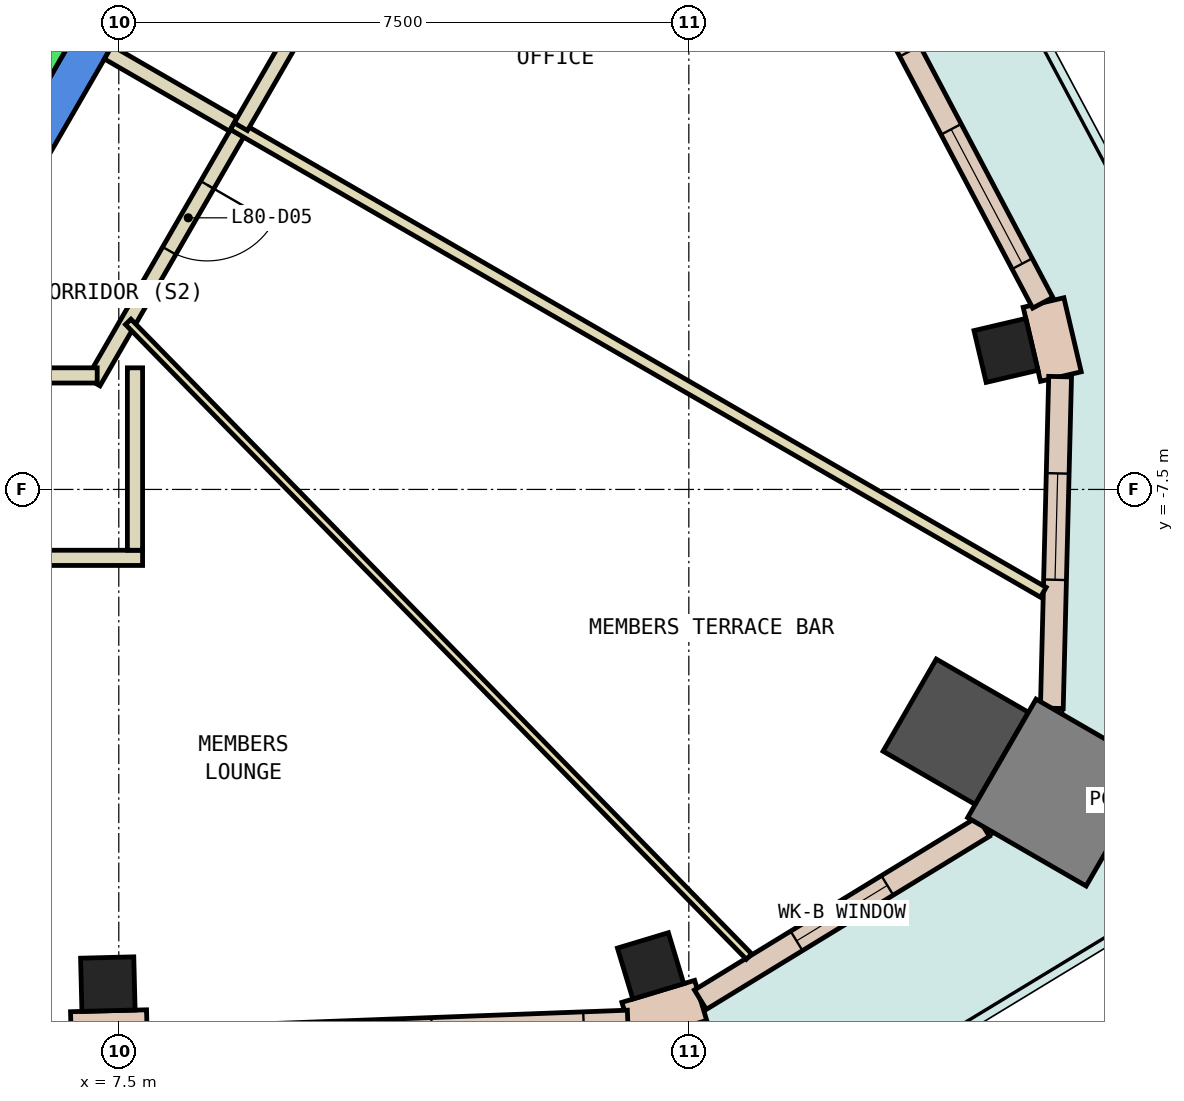
"""IFC4 building model, lengths in metres.
Left out: names, types, materials, properties, quantities, classifications, styles, units other than length and angle.
Written with IfcOpenShell. Run it as: python <this file> out.ifc"""

import sys

from ifc_helpers import new_model, si_unit, direction, frame, frame_2d, origin, origin_2d, place, context, subcontext, project, spatial, polyline, rectangle, outline, extrude, element, fill, save


model = new_model("IFC4")
c1 = context("Model", 3, precision=1e-05, world=origin(), true_north=direction((0.0, 1.0)))
c2 = subcontext(c1, "Body", "Model", "MODEL_VIEW")
j1 = project(units=[si_unit("LENGTHUNIT", "METRE"), si_unit("PLANEANGLEUNIT", "RADIAN")], contexts=[c1])
p1 = place(None, origin())
s1 = spatial("IfcSite", under=j1, at=p1, CompositionType="ELEMENT")
p2 = place(p1, origin())
s2 = spatial("IfcBuilding", under=s1, at=p2, CompositionType="ELEMENT")
p3 = place(p2, frame((0.0, 0.0, 340.4)))
s3 = spatial("IfcBuildingStorey", under=s2, at=p3, CompositionType="ELEMENT", Elevation=340.4)
for number, where, z_axis, x_axis in (
    (1, (7.356, -14.008, 0.0), (0.0, 0.0, 1.0), (1.0, 0.025, 0.0)),
    (2, (14.497, -13.768, 0.0), (0.0, 0.0, 1.0), (0.957, 0.289, 0.0)),
):
    element("IfcColumn", number, at=place(p3, frame(where, z_axis=z_axis, x_axis=x_axis)), inside=s3, PredefinedType="COLUMN", context=c2, shape_type="SweptSolid", body=[
        extrude(rectangle(XDim=0.7, YDim=0.7, at=origin_2d()), origin(), (0.0, 0.0, 1.0), 4.15),
    ])
p4 = place(p3, frame((18.512, -10.688, 0.0), z_axis=(0.0, 0.0, 1.0), x_axis=(-0.866025403784, 0.5, 0.0)))
e3 = element("IfcColumn", 3, at=p4, inside=s3, PredefinedType="COLUMN", context=c2, shape_type="SweptSolid", body=[
    extrude(rectangle(XDim=1.4, YDim=1.4, at=origin_2d()), origin(), (0.0, 0.0, 1.0), 4.15),
])
p5 = place(p3, frame((19.173, -5.671, 0.0), z_axis=(0.0, 0.0, 1.0), x_axis=(-0.228435830028, 0.973558971793, 0.0)))
e4 = element("IfcColumn", 4, at=p5, inside=s3, PredefinedType="COLUMN", context=c2, shape_type="SweptSolid", body=[
    extrude(rectangle(XDim=0.7, YDim=0.7, at=origin_2d()), origin(), (0.0, 0.0, 1.0), 4.15),
])
p6 = place(p3, frame((19.898, -11.488, 0.0), z_axis=(0.0, 0.0, 1.0), x_axis=(-0.866025403784, 0.5, 0.0)))
e5 = element("IfcColumn", 5, at=p6, inside=s3, PredefinedType="COLUMN", context=c2, shape_type="SweptSolid", body=[
    extrude(rectangle(XDim=1.8, YDim=1.8, at=origin_2d()), origin(), (0.0, 0.0, 1.0), 4.15),
])
p7 = place(p3, frame((0.0, 0.0, -0.45)))
e6 = element("IfcWall", 6, at=p7, inside=s3, PredefinedType="SHEAR", context=c2, shape_type="SweptSolid", body=[
    extrude(outline(polyline([(4.907, -6.0), (9.815, 2.5), (9.238, 2.5), (4.619, -5.5), (4.907, -6.0)])), origin(), (0.0, 0.0, 1.0), 4.6),
])
for number, where, z_axis, x_axis in (
    (7, (19.895, -6.015, 0.0), (0.0, 0.0, 1.0), (-0.228, 0.974, 0.0)),
    (8, (6.872, -14.646, 0.0), (0.0, 0.0, 1.0), (1.0, 0.025, 0.0)),
):
    element("IfcWall", number, at=place(p3, frame(where, z_axis=z_axis, x_axis=x_axis)), inside=s3, PredefinedType="STANDARD", context=c2, shape_type="SweptSolid", body=[
        extrude(rectangle(XDim=1.0, YDim=0.55, at=frame_2d((0.5, 0.0))), origin(), (0.0, 0.0, 1.0), 4.15),
    ])
p8 = place(p3, frame((14.199, -14.511, 0.0), z_axis=(0.0, 0.0, 1.0), x_axis=(0.957286907321, 0.289139718946, 0.0)))
e9 = element("IfcWall", 9, at=p8, inside=s3, PredefinedType="STANDARD", context=c2, shape_type="SweptSolid", body=[
    extrude(rectangle(XDim=1.0, YDim=0.55, at=frame_2d((0.5, 0.0))), origin(), (0.0, 0.0, 1.0), 4.15),
])
p9 = place(p3, frame((7.874, -14.739, 0.0), z_axis=(0.0, 0.0, 1.0), x_axis=(0.999292132587, 0.03761959262, 0.0)))
e10 = element("IfcWall", 10, at=p9, inside=s3, PredefinedType="STANDARD", context=c2, shape_type="SweptSolid", body=[
    extrude(rectangle(XDim=6.327, YDim=0.3, at=frame_2d((3.164, 0.0))), origin(), (0.0, 0.0, 1.0), 4.15),
])
p10 = place(p9, frame((0.582, 0.0, 0.9)))
e11 = element("IfcOpeningElement", 11, at=p10, cuts=e10, PredefinedType="OPENING", context=c2, shape_type="SweptSolid", body=[
    extrude(rectangle(XDim=2.0, YDim=3.0, at=frame_2d((1.0, 1.5))), frame((0.0, 0.16, 0.0), z_axis=(0.0, -1.0, 0.0), x_axis=(1.0, 0.0, 0.0)), (0.0, 0.0, 1.0), 0.32),
])
p11 = place(p9, frame((3.746, 0.0, 0.9)))
e12 = element("IfcOpeningElement", 12, at=p11, cuts=e10, PredefinedType="OPENING", context=c2, shape_type="SweptSolid", body=[
    extrude(rectangle(XDim=2.0, YDim=3.0, at=frame_2d((1.0, 1.5))), frame((0.0, 0.16, 0.0), z_axis=(0.0, -1.0, 0.0), x_axis=(1.0, 0.0, 0.0)), (0.0, 0.0, 1.0), 0.32),
])
p12 = place(p3, frame((15.152, -14.213, 0.0), z_axis=(0.0, 0.0, 1.0), x_axis=(0.853225151066, 0.521542751448, 0.0)))
e13 = element("IfcWall", 13, at=p12, inside=s3, PredefinedType="STANDARD", context=c2, shape_type="SweptSolid", body=[
    extrude(rectangle(XDim=4.366, YDim=0.3, at=frame_2d((2.183, 0.0))), origin(), (0.0, 0.0, 1.0), 4.15),
])
p13 = place(p12, frame((1.483, 0.0, 0.9)))
e14 = element("IfcOpeningElement", 14, at=p13, cuts=e13, PredefinedType="OPENING", context=c2, shape_type="SweptSolid", body=[
    extrude(rectangle(XDim=1.4, YDim=3.0, at=frame_2d((0.7, 1.5))), frame((0.0, 0.16, 0.0), z_axis=(0.0, -1.0, 0.0), x_axis=(1.0, 0.0, 0.0)), (0.0, 0.0, 1.0), 0.32),
])
p14 = place(p3, frame((19.776, -10.379, 0.0), z_axis=(0.0, 0.0, 1.0), x_axis=(0.025006167975, 0.99968729689, 0.0)))
e15 = element("IfcWall", 15, at=p14, inside=s3, PredefinedType="STANDARD", context=c2, shape_type="SweptSolid", body=[
    extrude(rectangle(XDim=4.364, YDim=0.3, at=frame_2d((2.182, 0.0))), origin(), (0.0, 0.0, 1.0), 4.15),
])
p15 = place(p14, frame((1.691, 0.0, 0.9)))
e16 = element("IfcOpeningElement", 16, at=p15, cuts=e15, PredefinedType="OPENING", context=c2, shape_type="SweptSolid", body=[
    extrude(rectangle(XDim=1.4, YDim=3.0, at=frame_2d((0.7, 1.5))), frame((0.0, 0.16, 0.0), z_axis=(0.0, -1.0, 0.0), x_axis=(1.0, 0.0, 0.0)), (0.0, 0.0, 1.0), 0.32),
])
p16 = place(p3, frame((19.657, -5.044, 0.0), z_axis=(0.0, 0.0, 1.0), x_axis=(-0.467155191513, 0.884175337274, 0.0)))
e17 = element("IfcWall", 17, at=p16, inside=s3, PredefinedType="STANDARD", context=c2, shape_type="SweptSolid", body=[
    extrude(rectangle(XDim=6.326, YDim=0.3, at=frame_2d((3.163, 0.0))), origin(), (0.0, 0.0, 1.0), 4.15),
])
p17 = place(p16, frame((0.581, 0.0, 0.9)))
e18 = element("IfcOpeningElement", 18, at=p17, cuts=e17, PredefinedType="OPENING", context=c2, shape_type="SweptSolid", body=[
    extrude(rectangle(XDim=2.0, YDim=3.0, at=frame_2d((1.0, 1.5))), frame((0.0, 0.16, 0.0), z_axis=(0.0, -1.0, 0.0), x_axis=(1.0, 0.0, 0.0)), (0.0, 0.0, 1.0), 0.32),
])
p18 = place(p16, frame((3.744, 0.0, 0.9)))
e19 = element("IfcOpeningElement", 19, at=p18, cuts=e17, PredefinedType="OPENING", context=c2, shape_type="SweptSolid", body=[
    extrude(rectangle(XDim=2.0, YDim=3.0, at=frame_2d((1.0, 1.5))), frame((0.0, 0.16, 0.0), z_axis=(0.0, -1.0, 0.0), x_axis=(1.0, 0.0, 0.0)), (0.0, 0.0, 1.0), 0.32),
])
p19 = place(p3, frame((7.813, -8.4, 0.0), z_axis=(0.0, 0.0, 1.0), x_axis=(-1.0, 0.0, 0.0)))
e20 = element("IfcWall", 20, at=p19, inside=s3, PredefinedType="PARTITIONING", context=c2, shape_type="SweptSolid", body=[
    extrude(rectangle(XDim=5.769, YDim=0.2, at=frame_2d((2.885, 0.0))), origin(), (0.0, 0.0, 1.0), 4.15),
])
p20 = place(p19, frame((2.289, 0.0, 0.0)))
e21 = element("IfcOpeningElement", 21, at=p20, cuts=e20, PredefinedType="OPENING", context=c2, shape_type="SweptSolid", body=[
    extrude(rectangle(XDim=1.0, YDim=2.1, at=frame_2d((0.5, 1.05))), frame((0.0, 0.11, 0.0), z_axis=(0.0, -1.0, 0.0), x_axis=(1.0, 0.0, 0.0)), (0.0, 0.0, 1.0), 0.22),
])
p21 = place(p3, frame((7.713, -5.9, 0.0), z_axis=(0.0, 0.0, 1.0), x_axis=(0.0, -1.0, 0.0)))
e22 = element("IfcWall", 22, at=p21, inside=s3, PredefinedType="PARTITIONING", context=c2, shape_type="SweptSolid", body=[
    extrude(rectangle(XDim=2.4, YDim=0.2, at=frame_2d((1.2, 0.0))), origin(), (0.0, 0.0, 1.0), 4.15),
])
p22 = place(p3, frame((9.106, -2.728, 0.0), z_axis=(0.0, 0.0, 1.0), x_axis=(-0.500132879116, -0.865948672398, 0.0)))
e23 = element("IfcWall", 23, at=p22, inside=s3, PredefinedType="PARTITIONING", context=c2, shape_type="SweptSolid", body=[
    extrude(rectangle(XDim=3.879, YDim=0.2, at=frame_2d((1.939, 0.0))), origin(), (0.0, 0.0, 1.0), 4.15),
])
p23 = place(p22, frame((0.884, 0.0, 0.0)))
e24 = element("IfcOpeningElement", 24, at=p23, cuts=e23, PredefinedType="OPENING", context=c2, shape_type="SweptSolid", body=[
    extrude(rectangle(XDim=1.0, YDim=2.1, at=frame_2d((0.5, 1.05))), frame((0.0, 0.11, 0.0), z_axis=(0.0, -1.0, 0.0), x_axis=(1.0, 0.0, 0.0)), (0.0, 0.0, 1.0), 0.22),
])
p24 = place(p3, frame((7.361, -1.75, 0.0), z_axis=(0.0, 0.0, 1.0), x_axis=(0.865980106173, -0.500078449558, 0.0)))
e25 = element("IfcWall", 25, at=p24, inside=s3, PredefinedType="PARTITIONING", context=c2, shape_type="SweptSolid", body=[
    extrude(rectangle(XDim=1.9, YDim=0.2, at=frame_2d((0.95, 0.0))), origin(), (0.0, 0.0, 1.0), 4.15),
])
p25 = place(p3, frame((7.624, -5.295, 0.0), z_axis=(0.0, 0.0, 1.0), x_axis=(0.699225895869, -0.714900794898, 0.0)))
e26 = element("IfcWall", 26, at=p25, inside=s3, PredefinedType="PARTITIONING", context=c2, shape_type="SweptSolid", body=[
    extrude(rectangle(XDim=11.681, YDim=0.1, at=frame_2d((5.841, 0.0))), origin(), (0.0, 0.0, 1.0), 4.15),
])
p26 = place(p3, frame((19.664, -8.853, 0.0), z_axis=(0.0, 0.0, 1.0), x_axis=(-0.866035935173, 0.499981758657, 0.0)))
e27 = element("IfcWall", 27, at=p26, inside=s3, PredefinedType="PARTITIONING", context=c2, shape_type="SweptSolid", body=[
    extrude(rectangle(XDim=12.307, YDim=0.15, at=frame_2d((6.153, 0.0))), origin(), (0.0, 0.0, 1.0), 4.15),
])
p27 = place(p3, frame((12.074, 2.413, 0.0), z_axis=(0.0, 0.0, 1.0), x_axis=(-0.499974029402, -0.866040397397, 0.0)))
e28 = element("IfcWall", 28, at=p27, inside=s3, PredefinedType="PARTITIONING", context=c2, shape_type="SweptSolid", body=[
    extrude(rectangle(XDim=5.936, YDim=0.2, at=frame_2d((2.968, 0.0))), origin(), (0.0, 0.0, 1.0), 4.15),
])
p28 = place(p3, frame((5.076, -6.0, 0.0), z_axis=(0.0, 0.0, 1.0), x_axis=(1.0, 0.0, 0.0)))
e29 = element("IfcWall", 29, at=p28, inside=s3, PredefinedType="PARTITIONING", context=c2, shape_type="SweptSolid", body=[
    extrude(rectangle(XDim=2.14, YDim=0.2, at=frame_2d((1.07, 0.0))), origin(), (0.0, 0.0, 1.0), 4.15),
])
p29 = place(p28, frame((0.336, 0.0, 0.0)))
e30 = element("IfcOpeningElement", 30, at=p29, cuts=e29, PredefinedType="OPENING", context=c2, shape_type="SweptSolid", body=[
    extrude(rectangle(XDim=1.0, YDim=2.1, at=frame_2d((0.5, 1.05))), frame((0.0, 0.11, 0.0), z_axis=(0.0, -1.0, 0.0), x_axis=(1.0, 0.0, 0.0)), (0.0, 0.0, 1.0), 0.22),
])
p30 = place(p3, frame((5.492, -3.788, 0.0), z_axis=(0.0, 0.0, 1.0), x_axis=(0.500034260056, 0.866005622828, 0.0)))
e31 = element("IfcWall", 31, at=p30, inside=s3, PredefinedType="STANDARD", context=c2, shape_type="SweptSolid", body=[
    extrude(rectangle(XDim=5.399, YDim=0.2, at=frame_2d((2.7, 0.0))), origin(), (0.0, 0.0, 1.0), 4.15),
])
p31 = place(p11, origin())
e32 = element("IfcWindow", 32, at=p31, inside=s3, PartitioningType="SINGLE_PANEL", PredefinedType="WINDOW", context=c2, shape_type="SweptSolid", body=[
    extrude(rectangle(XDim=2.0, YDim=3.0, at=frame_2d((1.0, 1.5))), frame((0.0, 0.03, 0.0), z_axis=(0.0, -1.0, 0.0), x_axis=(1.0, 0.0, 0.0)), (0.0, 0.0, 1.0), 0.06),
])
fill(e12, e32)
p32 = place(p13, origin())
e33 = element("IfcWindow", 33, at=p32, inside=s3, PartitioningType="SINGLE_PANEL", PredefinedType="WINDOW", context=c2, shape_type="SweptSolid", body=[
    extrude(rectangle(XDim=1.4, YDim=3.0, at=frame_2d((0.7, 1.5))), frame((0.0, 0.03, 0.0), z_axis=(0.0, -1.0, 0.0), x_axis=(1.0, 0.0, 0.0)), (0.0, 0.0, 1.0), 0.06),
])
fill(e14, e33)
p33 = place(p15, origin())
e34 = element("IfcWindow", 34, at=p33, inside=s3, PartitioningType="SINGLE_PANEL", PredefinedType="WINDOW", context=c2, shape_type="SweptSolid", body=[
    extrude(rectangle(XDim=1.4, YDim=3.0, at=frame_2d((0.7, 1.5))), frame((0.0, 0.03, 0.0), z_axis=(0.0, -1.0, 0.0), x_axis=(1.0, 0.0, 0.0)), (0.0, 0.0, 1.0), 0.06),
])
fill(e16, e34)
p34 = place(p17, origin())
e35 = element("IfcWindow", 35, at=p34, inside=s3, PartitioningType="SINGLE_PANEL", PredefinedType="WINDOW", context=c2, shape_type="SweptSolid", body=[
    extrude(rectangle(XDim=2.0, YDim=3.0, at=frame_2d((1.0, 1.5))), frame((0.0, 0.03, 0.0), z_axis=(0.0, -1.0, 0.0), x_axis=(1.0, 0.0, 0.0)), (0.0, 0.0, 1.0), 0.06),
])
fill(e18, e35)
p35 = place(p23, origin())
e36 = element("IfcDoor", 36, at=p35, inside=s3, OperationType="SINGLE_SWING_LEFT", PredefinedType="DOOR", context=c2, shape_type="SweptSolid", body=[
    extrude(rectangle(XDim=1.0, YDim=2.1, at=frame_2d((0.5, 1.05))), frame((0.0, 0.025, 0.0), z_axis=(0.0, -1.0, 0.0), x_axis=(1.0, 0.0, 0.0)), (0.0, 0.0, 1.0), 0.05),
])
fill(e24, e36)
save(model, sys.argv[1])
